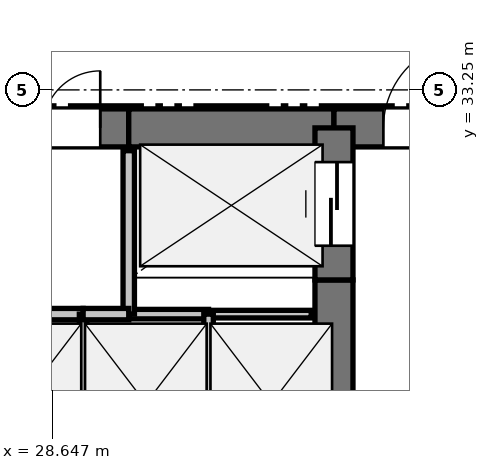
"""IFC4 building model, lengths in metres.
Left out: names, types, materials, properties, quantities, classifications, styles, units other than length and angle.
Written with IfcOpenShell. Run it as: python <this file> out.ifc"""

import sys

from ifc_helpers import new_model, si_unit, direction, frame, frame_2d, origin, place, context, subcontext, project, spatial, rectangle, extrude, element, fill, save


model = new_model("IFC4")
c1 = context("Model", 3, precision=1e-05, world=origin(), true_north=direction((0.0, 1.0)))
c2 = subcontext(c1, "Body", "Model", "MODEL_VIEW")
j1 = project(units=[si_unit("LENGTHUNIT", "METRE"), si_unit("PLANEANGLEUNIT", "RADIAN")], contexts=[c1])
p1 = place(None, origin())
s1 = spatial("IfcSite", under=j1, at=p1, CompositionType="ELEMENT")
p2 = place(p1, origin())
s2 = spatial("IfcBuilding", under=s1, at=p2, CompositionType="ELEMENT")
p3 = place(p2, frame((0.0, 0.0, 73.5)))
s3 = spatial("IfcBuildingStorey", under=s2, at=p3, CompositionType="ELEMENT", Elevation=73.5)
p4 = place(p3, frame((27.4, 32.75, 0.0), z_axis=(0.0, 0.0, 1.0), x_axis=(1.0, 0.0, 0.0)))
e1 = element("IfcWall", 1, at=p4, inside=s3, PredefinedType="SHEAR", context=c2, shape_type="SweptSolid", body=[
    extrude(rectangle(XDim=2.25, YDim=0.5, at=frame_2d((1.125, 0.0))), origin(), (0.0, 0.0, 1.0), 3.05),
])
p5 = place(p4, frame((0.375, 0.0, 0.0)))
e2 = element("IfcOpeningElement", 2, at=p5, cuts=e1, PredefinedType="OPENING", context=c2, shape_type="SweptSolid", body=[
    extrude(rectangle(XDim=1.5, YDim=2.2, at=frame_2d((0.75, 1.1))), frame((0.0, 0.26, 0.0), z_axis=(0.0, -1.0, 0.0), x_axis=(1.0, 0.0, 0.0)), (0.0, 0.0, 1.0), 0.52),
])
p6 = place(p3, frame((29.65, 32.75, 0.0), z_axis=(0.0, 0.0, 1.0), x_axis=(1.0, 0.0, 0.0)))
e3 = element("IfcWall", 3, at=p6, inside=s3, PredefinedType="SHEAR", context=c2, shape_type="SweptSolid", body=[
    extrude(rectangle(XDim=2.7, YDim=0.5, at=frame_2d((1.35, 0.0))), origin(), (0.0, 0.0, 1.0), 3.05),
])
p7 = place(p3, frame((32.35, 32.75, 0.0), z_axis=(0.0, 0.0, 1.0), x_axis=(1.0, 0.0, 0.0)))
e4 = element("IfcWall", 4, at=p7, inside=s3, PredefinedType="SHEAR", context=c2, shape_type="SweptSolid", body=[
    extrude(rectangle(XDim=3.45, YDim=0.5, at=frame_2d((1.725, 0.0))), origin(), (0.0, 0.0, 1.0), 3.05),
])
p8 = place(p7, frame((0.65, 0.0, 0.0)))
e5 = element("IfcOpeningElement", 5, at=p8, cuts=e4, PredefinedType="OPENING", context=c2, shape_type="SweptSolid", body=[
    extrude(rectangle(XDim=1.15, YDim=2.15, at=frame_2d((0.575, 1.075))), frame((0.0, 0.26, 0.0), z_axis=(0.0, -1.0, 0.0), x_axis=(1.0, 0.0, 0.0)), (0.0, 0.0, 1.0), 0.52),
])
p9 = place(p3, frame((32.35, 27.95, 0.0), z_axis=(0.0, 0.0, 1.0), x_axis=(0.0, 1.0, 0.0)))
e6 = element("IfcWall", 6, at=p9, inside=s3, PredefinedType="SHEAR", context=c2, shape_type="SweptSolid", body=[
    extrude(rectangle(XDim=2.8, YDim=0.5, at=frame_2d((1.4, 0.0))), origin(), (0.0, 0.0, 1.0), 3.05),
])
p10 = place(p3, frame((32.35, 30.75, 0.0), z_axis=(0.0, 0.0, 1.0), x_axis=(0.0, 1.0, 0.0)))
e7 = element("IfcWall", 7, at=p10, inside=s3, PredefinedType="SHEAR", context=c2, shape_type="SweptSolid", body=[
    extrude(rectangle(XDim=2.0, YDim=0.5, at=frame_2d((1.0, 0.0))), origin(), (0.0, 0.0, 1.0), 3.05),
])
p11 = place(p10, frame((0.45, 0.0, 0.0)))
e8 = element("IfcOpeningElement", 8, at=p11, cuts=e7, PredefinedType="OPENING", context=c2, shape_type="SweptSolid", body=[
    extrude(rectangle(XDim=1.1, YDim=2.15, at=frame_2d((0.55, 1.075))), frame((0.0, 0.26, 0.0), z_axis=(0.0, -1.0, 0.0), x_axis=(1.0, 0.0, 0.0)), (0.0, 0.0, 1.0), 0.52),
])
p12 = place(p3, frame((32.05, 30.3, 0.0), z_axis=(0.0, 0.0, 1.0), x_axis=(-1.0, 0.0, 0.0)))
e9 = element("IfcWall", 9, at=p12, inside=s3, PredefinedType="PARTITIONING", context=c2, shape_type="SweptSolid", body=[
    extrude(rectangle(XDim=1.35, YDim=0.1, at=frame_2d((0.675, 0.0))), origin(), (0.0, 0.0, 1.0), 3.05),
])
p13 = place(p3, frame((30.7, 30.3, 0.0), z_axis=(0.0, 0.0, 1.0), x_axis=(-1.0, 0.0, 0.0)))
e10 = element("IfcWall", 10, at=p13, inside=s3, PredefinedType="PARTITIONING", context=c2, shape_type="SweptSolid", body=[
    extrude(rectangle(XDim=1.05, YDim=0.125, at=frame_2d((0.525, 0.0))), origin(), (0.0, 0.0, 1.0), 3.05),
])
p14 = place(p3, frame((29.65, 30.3, 0.0), z_axis=(0.0, 0.0, 1.0), x_axis=(0.0, 1.0, 0.0)))
e11 = element("IfcWall", 11, at=p14, inside=s3, PredefinedType="PARTITIONING", context=c2, shape_type="SweptSolid", body=[
    extrude(rectangle(XDim=2.15, YDim=0.15, at=frame_2d((1.075, 0.0))), origin(), (0.0, 0.0, 1.0), 3.05),
])
p15 = place(p3, frame((27.4, 30.3, 0.0), z_axis=(0.0, 0.0, 1.0), x_axis=(1.0, 0.0, 0.0)))
e12 = element("IfcWall", 12, at=p15, inside=s3, PredefinedType="PARTITIONING", context=c2, shape_type="SweptSolid", body=[
    extrude(rectangle(XDim=1.65, YDim=0.15, at=frame_2d((0.825, 0.0))), origin(), (0.0, 0.0, 1.0), 3.05),
])
p16 = place(p3, frame((29.05, 30.3, 0.0), z_axis=(0.0, 0.0, 1.0), x_axis=(0.0, -1.0, 0.0)))
e13 = element("IfcWall", 13, at=p16, inside=s3, PredefinedType="PARTITIONING", context=c2, shape_type="SweptSolid", body=[
    extrude(rectangle(XDim=2.2, YDim=0.1, at=frame_2d((1.1, 0.0))), origin(), (0.0, 0.0, 1.0), 3.05),
])
p17 = place(p3, frame((29.05, 30.3, 0.0), z_axis=(0.0, 0.0, 1.0), x_axis=(1.0, 0.0, 0.0)))
e14 = element("IfcWall", 14, at=p17, inside=s3, PredefinedType="PARTITIONING", context=c2, shape_type="SweptSolid", body=[
    extrude(rectangle(XDim=0.6, YDim=0.15, at=frame_2d((0.3, 0.0))), origin(), (0.0, 0.0, 1.0), 3.05),
])
p18 = place(p3, frame((30.7, 30.3, 0.0), z_axis=(0.0, 0.0, 1.0), x_axis=(0.0, -1.0, 0.0)))
e15 = element("IfcWall", 15, at=p18, inside=s3, PredefinedType="PARTITIONING", context=c2, shape_type="SweptSolid", body=[
    extrude(rectangle(XDim=2.2, YDim=0.125, at=frame_2d((1.1, 0.0))), origin(), (0.0, 0.0, 1.0), 3.05),
])
p19 = place(p11, origin())
e16 = element("IfcDoor", 16, at=p19, inside=s3, OperationType="SLIDING_TO_LEFT", PredefinedType="DOOR", context=c2, shape_type="SweptSolid", body=[
    extrude(rectangle(XDim=1.1, YDim=2.15, at=frame_2d((0.55, 1.075))), frame((0.0, 0.025, 0.0), z_axis=(0.0, -1.0, 0.0), x_axis=(1.0, 0.0, 0.0)), (0.0, 0.0, 1.0), 0.05),
])
fill(e8, e16)
p20 = place(p8, origin())
e17 = element("IfcDoor", 17, at=p20, inside=s3, OperationType="SINGLE_SWING_RIGHT", PredefinedType="DOOR", context=c2, shape_type="SweptSolid", body=[
    extrude(rectangle(XDim=1.15, YDim=2.15, at=frame_2d((0.575, 1.075))), frame((0.0, 0.025, 0.0), z_axis=(0.0, -1.0, 0.0), x_axis=(1.0, 0.0, 0.0)), (0.0, 0.0, 1.0), 0.05),
])
fill(e5, e17)
p21 = place(p5, origin())
e18 = element("IfcDoor", 18, at=p21, inside=s3, OperationType="DOUBLE_DOOR_SINGLE_SWING", PredefinedType="DOOR", context=c2, shape_type="SweptSolid", body=[
    extrude(rectangle(XDim=1.5, YDim=2.2, at=frame_2d((0.75, 1.1))), frame((0.0, 0.025, 0.0), z_axis=(0.0, -1.0, 0.0), x_axis=(1.0, 0.0, 0.0)), (0.0, 0.0, 1.0), 0.05),
])
fill(e2, e18)
save(model, sys.argv[1])
